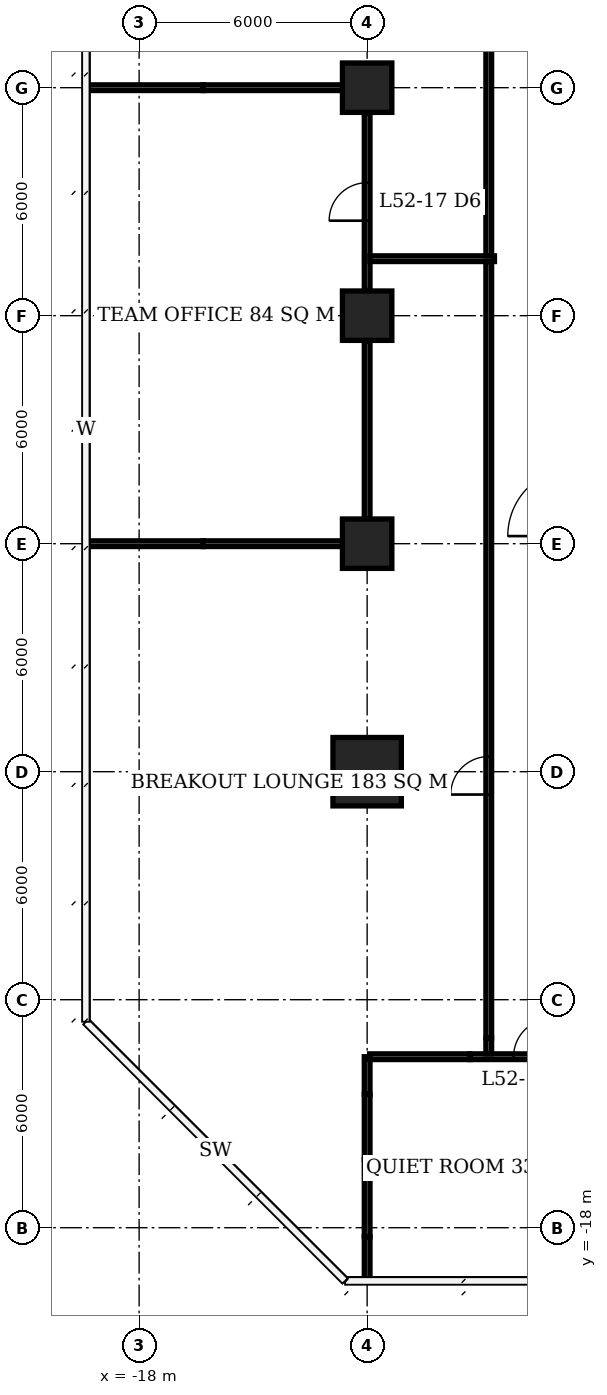
"""IFC4 building model, lengths in metres.
Left out: names, types, materials, properties, quantities, classifications, styles, units other than length and angle.
Written with IfcOpenShell. Run it as: python <this file> out.ifc"""

import sys

from ifc_helpers import new_model, si_unit, direction, frame, frame_2d, origin, origin_2d, place, context, subcontext, project, spatial, rectangle, extrude, element, fill, save


model = new_model("IFC4")
c1 = context("Model", 3, precision=1e-05, world=origin(), true_north=direction((0.0, 1.0)))
c2 = subcontext(c1, "Body", "Model", "MODEL_VIEW")
j1 = project(units=[si_unit("LENGTHUNIT", "METRE"), si_unit("PLANEANGLEUNIT", "RADIAN")], contexts=[c1])
p1 = place(None, origin())
s1 = spatial("IfcSite", under=j1, at=p1, CompositionType="ELEMENT")
p2 = place(p1, origin())
s2 = spatial("IfcBuilding", under=s1, at=p2, CompositionType="ELEMENT")
p3 = place(p2, frame((0.0, 0.0, 212.3)))
s3 = spatial("IfcBuildingStorey", under=s2, at=p3, CompositionType="ELEMENT", Elevation=212.3)
p4 = place(p3, frame((-12.0, -6.0, 0.0), z_axis=(0.0, 0.0, 1.0), x_axis=(1.0, 0.0, 0.0)))
e1 = element("IfcColumn", 1, at=p4, inside=s3, PredefinedType="COLUMN", context=c2, shape_type="SweptSolid", body=[
    extrude(rectangle(XDim=1.8, YDim=1.8, at=origin_2d()), origin(), (0.0, 0.0, 1.0), 3.9),
])
for number, where, z_axis, x_axis in (
    (2, (-12.0, 0.0, 0.0), (0.0, 0.0, 1.0), (1.0, 0.0, 0.0)),
    (3, (-12.0, 6.0, 0.0), (0.0, 0.0, 1.0), (1.0, 0.0, 0.0)),
    (4, (-12.0, 12.0, 0.0), (0.0, 0.0, 1.0), (1.0, 0.0, 0.0)),
):
    element("IfcColumn", number, at=place(p3, frame(where, z_axis=z_axis, x_axis=x_axis)), inside=s3, PredefinedType="COLUMN", context=c2, shape_type="SweptSolid", body=[
        extrude(rectangle(XDim=1.3, YDim=1.3, at=origin_2d()), origin(), (0.0, 0.0, 1.0), 3.9),
    ])
p5 = place(p3, frame((-11.935, -13.5, 0.0), z_axis=(0.0, 0.0, 1.0), x_axis=(1.0, 0.0, 0.0)))
e5 = element("IfcWall", 5, at=p5, inside=s3, PredefinedType="PARTITIONING", context=c2, shape_type="SweptSolid", body=[
    extrude(rectangle(XDim=2.643, YDim=0.15, at=frame_2d((1.322, 0.0))), origin(), (0.0, 0.0, 1.0), 3.65),
])
p6 = place(p3, frame((-9.292, -13.5, 0.0), z_axis=(0.0, 0.0, 1.0), x_axis=(1.0, 0.0, 0.0)))
e6 = element("IfcWall", 6, at=p6, inside=s3, PredefinedType="PARTITIONING", context=c2, shape_type="SweptSolid", body=[
    extrude(rectangle(XDim=3.217, YDim=0.15, at=frame_2d((1.608, 0.0))), origin(), (0.0, 0.0, 1.0), 2.65),
])
p7 = place(p6, frame((1.146, 0.0, 0.0)))
e7 = element("IfcOpeningElement", 7, at=p7, cuts=e6, PredefinedType="OPENING", context=c2, shape_type="SweptSolid", body=[
    extrude(rectangle(XDim=1.0, YDim=2.1, at=frame_2d((0.5, 1.05))), frame((0.0, 0.085, 0.0), z_axis=(0.0, -1.0, 0.0), x_axis=(1.0, 0.0, 0.0)), (0.0, 0.0, 1.0), 0.17),
])
p8 = place(p3, frame((-19.35, 0.0, 0.0), z_axis=(0.0, 0.0, 1.0), x_axis=(1.0, 0.0, 0.0)))
e8 = element("IfcWall", 8, at=p8, inside=s3, PredefinedType="PARTITIONING", context=c2, shape_type="SweptSolid", body=[
    extrude(rectangle(XDim=3.04, YDim=0.15, at=frame_2d((1.52, 0.0))), origin(), (0.0, 0.0, 1.0), 3.65),
])
p9 = place(p3, frame((-16.31, 0.0, 0.0), z_axis=(0.0, 0.0, 1.0), x_axis=(1.0, 0.0, 0.0)))
e9 = element("IfcWall", 9, at=p9, inside=s3, PredefinedType="PARTITIONING", context=c2, shape_type="SweptSolid", body=[
    extrude(rectangle(XDim=3.66, YDim=0.15, at=frame_2d((1.83, 0.0))), origin(), (0.0, 0.0, 1.0), 2.65),
])
p10 = place(p3, frame((-19.4, 12.0, 0.0), z_axis=(0.0, 0.0, 1.0), x_axis=(1.0, 0.0, 0.0)))
e10 = element("IfcWall", 10, at=p10, inside=s3, PredefinedType="PARTITIONING", context=c2, shape_type="SweptSolid", body=[
    extrude(rectangle(XDim=3.09, YDim=0.15, at=frame_2d((1.545, 0.0))), origin(), (0.0, 0.0, 1.0), 3.65),
])
p11 = place(p3, frame((-16.31, 12.0, 0.0), z_axis=(0.0, 0.0, 1.0), x_axis=(1.0, 0.0, 0.0)))
e11 = element("IfcWall", 11, at=p11, inside=s3, PredefinedType="PARTITIONING", context=c2, shape_type="SweptSolid", body=[
    extrude(rectangle(XDim=3.66, YDim=0.15, at=frame_2d((1.83, 0.0))), origin(), (0.0, 0.0, 1.0), 2.65),
])
p12 = place(p3, frame((-12.0, -19.4, 0.0), z_axis=(0.0, 0.0, 1.0), x_axis=(0.0, 1.0, 0.0)))
e12 = element("IfcWall", 12, at=p12, inside=s3, PredefinedType="PARTITIONING", context=c2, shape_type="SweptSolid", body=[
    extrude(rectangle(XDim=1.163, YDim=0.15, at=frame_2d((0.582, 0.0))), origin(), (0.0, 0.0, 1.0), 3.65),
])
p13 = place(p3, frame((-12.0, -18.237, 0.0), z_axis=(0.0, 0.0, 1.0), x_axis=(0.0, 1.0, 0.0)))
e13 = element("IfcWall", 13, at=p13, inside=s3, PredefinedType="PARTITIONING", context=c2, shape_type="SweptSolid", body=[
    extrude(rectangle(XDim=2.029, YDim=0.15, at=frame_2d((1.015, 0.0))), origin(), (0.0, 0.0, 1.0), 2.65),
])
p14 = place(p3, frame((-12.0, -16.208, 0.0), z_axis=(0.0, 0.0, 1.0), x_axis=(0.0, 1.0, 0.0)))
e14 = element("IfcWall", 14, at=p14, inside=s3, PredefinedType="PARTITIONING", context=c2, shape_type="SweptSolid", body=[
    extrude(rectangle(XDim=1.718, YDim=0.15, at=frame_2d((0.859, 0.0))), origin(), (0.0, 0.0, 1.0), 3.65),
])
p15 = place(p3, frame((-12.0, -14.49, 0.0), z_axis=(0.0, 0.0, 1.0), x_axis=(0.0, 1.0, 0.0)))
e15 = element("IfcWall", 15, at=p15, inside=s3, PredefinedType="PARTITIONING", context=c2, shape_type="SweptSolid", body=[
    extrude(rectangle(XDim=0.99, YDim=0.15, at=frame_2d((0.495, 0.0))), origin(), (0.0, 0.0, 1.0), 2.65),
])
p16 = place(p3, frame((-12.0, 0.66, 0.0), z_axis=(0.0, 0.0, 1.0), x_axis=(0.0, 1.0, 0.0)))
e16 = element("IfcWall", 16, at=p16, inside=s3, PredefinedType="PARTITIONING", context=c2, shape_type="SweptSolid", body=[
    extrude(rectangle(XDim=4.68, YDim=0.15, at=frame_2d((2.34, 0.0))), origin(), (0.0, 0.0, 1.0), 3.65),
])
p17 = place(p3, frame((-12.0, 6.66, 0.0), z_axis=(0.0, 0.0, 1.0), x_axis=(0.0, 1.0, 0.0)))
e17 = element("IfcWall", 17, at=p17, inside=s3, PredefinedType="PARTITIONING", context=c2, shape_type="SweptSolid", body=[
    extrude(rectangle(XDim=4.68, YDim=0.15, at=frame_2d((2.34, 0.0))), origin(), (0.0, 0.0, 1.0), 3.65),
])
p18 = place(p17, frame((1.84, 0.0, 0.0)))
e18 = element("IfcOpeningElement", 18, at=p18, cuts=e17, PredefinedType="OPENING", context=c2, shape_type="SweptSolid", body=[
    extrude(rectangle(XDim=1.0, YDim=2.1, at=frame_2d((0.5, 1.05))), frame((0.0, 0.085, 0.0), z_axis=(0.0, -1.0, 0.0), x_axis=(1.0, 0.0, 0.0)), (0.0, 0.0, 1.0), 0.17),
])
p19 = place(p3, frame((-11.925, 7.5, 0.0), z_axis=(0.0, 0.0, 1.0), x_axis=(1.0, 0.0, 0.0)))
e19 = element("IfcWall", 19, at=p19, inside=s3, PredefinedType="PARTITIONING", context=c2, shape_type="SweptSolid", body=[
    extrude(rectangle(XDim=3.275, YDim=0.15, at=frame_2d((1.638, 0.0))), origin(), (0.0, 0.0, 1.0), 3.65),
])
p20 = place(p3, frame((-8.8, -13.425, 0.0), z_axis=(0.0, 0.0, 1.0), x_axis=(0.0, 1.0, 0.0)))
e20 = element("IfcWall", 20, at=p20, inside=s3, PredefinedType="PARTITIONING", context=c2, shape_type="SweptSolid", body=[
    extrude(rectangle(XDim=0.417, YDim=0.15, at=frame_2d((0.208, 0.0))), origin(), (0.0, 0.0, 1.0), 2.65),
])
p21 = place(p3, frame((-8.8, -13.008, 0.0), z_axis=(0.0, 0.0, 1.0), x_axis=(0.0, 1.0, 0.0)))
e21 = element("IfcWall", 21, at=p21, inside=s3, PredefinedType="PARTITIONING", context=c2, shape_type="SweptSolid", body=[
    extrude(rectangle(XDim=20.433, YDim=0.15, at=frame_2d((10.216, 0.0))), origin(), (0.0, 0.0, 1.0), 3.65),
])
p22 = place(p21, frame((6.407, 0.0, 0.0)))
e22 = element("IfcOpeningElement", 22, at=p22, cuts=e21, PredefinedType="OPENING", context=c2, shape_type="SweptSolid", body=[
    extrude(rectangle(XDim=1.0, YDim=2.1, at=frame_2d((0.5, 1.05))), frame((0.0, 0.085, 0.0), z_axis=(0.0, -1.0, 0.0), x_axis=(1.0, 0.0, 0.0)), (0.0, 0.0, 1.0), 0.17),
])
p23 = place(p3, frame((-8.8, 7.575, 0.0), z_axis=(0.0, 0.0, 1.0), x_axis=(0.0, 1.0, 0.0)))
e23 = element("IfcWall", 23, at=p23, inside=s3, PredefinedType="PARTITIONING", context=c2, shape_type="SweptSolid", body=[
    extrude(rectangle(XDim=17.825, YDim=0.15, at=frame_2d((8.913, 0.0))), origin(), (0.0, 0.0, 1.0), 3.65),
])
p24 = place(p23, frame((5.655, 0.0, 0.0)))
e24 = element("IfcOpeningElement", 24, at=p24, cuts=e23, PredefinedType="OPENING", context=c2, shape_type="SweptSolid", body=[
    extrude(rectangle(XDim=1.0, YDim=2.1, at=frame_2d((0.5, 1.05))), frame((0.0, 0.085, 0.0), z_axis=(0.0, -1.0, 0.0), x_axis=(1.0, 0.0, 0.0)), (0.0, 0.0, 1.0), 0.17),
])
p25 = place(p7, origin())
e25 = element("IfcDoor", 25, at=p25, inside=s3, OperationType="SINGLE_SWING_RIGHT", PredefinedType="DOOR", context=c2, shape_type="SweptSolid", body=[
    extrude(rectangle(XDim=1.0, YDim=2.1, at=frame_2d((0.5, 1.05))), frame((0.0, 0.025, 0.0), z_axis=(0.0, -1.0, 0.0), x_axis=(1.0, 0.0, 0.0)), (0.0, 0.0, 1.0), 0.05),
])
fill(e7, e25)
p26 = place(p18, origin())
e26 = element("IfcDoor", 26, at=p26, inside=s3, OperationType="SINGLE_SWING_LEFT", PredefinedType="DOOR", context=c2, shape_type="SweptSolid", body=[
    extrude(rectangle(XDim=1.0, YDim=2.1, at=frame_2d((0.5, 1.05))), frame((0.0, 0.025, 0.0), z_axis=(0.0, -1.0, 0.0), x_axis=(1.0, 0.0, 0.0)), (0.0, 0.0, 1.0), 0.05),
])
fill(e18, e26)
p27 = place(p22, origin())
e27 = element("IfcDoor", 27, at=p27, inside=s3, OperationType="SINGLE_SWING_LEFT", PredefinedType="DOOR", context=c2, shape_type="SweptSolid", body=[
    extrude(rectangle(XDim=1.0, YDim=2.1, at=frame_2d((0.5, 1.05))), frame((0.0, 0.025, 0.0), z_axis=(0.0, -1.0, 0.0), x_axis=(1.0, 0.0, 0.0)), (0.0, 0.0, 1.0), 0.05),
])
fill(e22, e27)
save(model, sys.argv[1])
